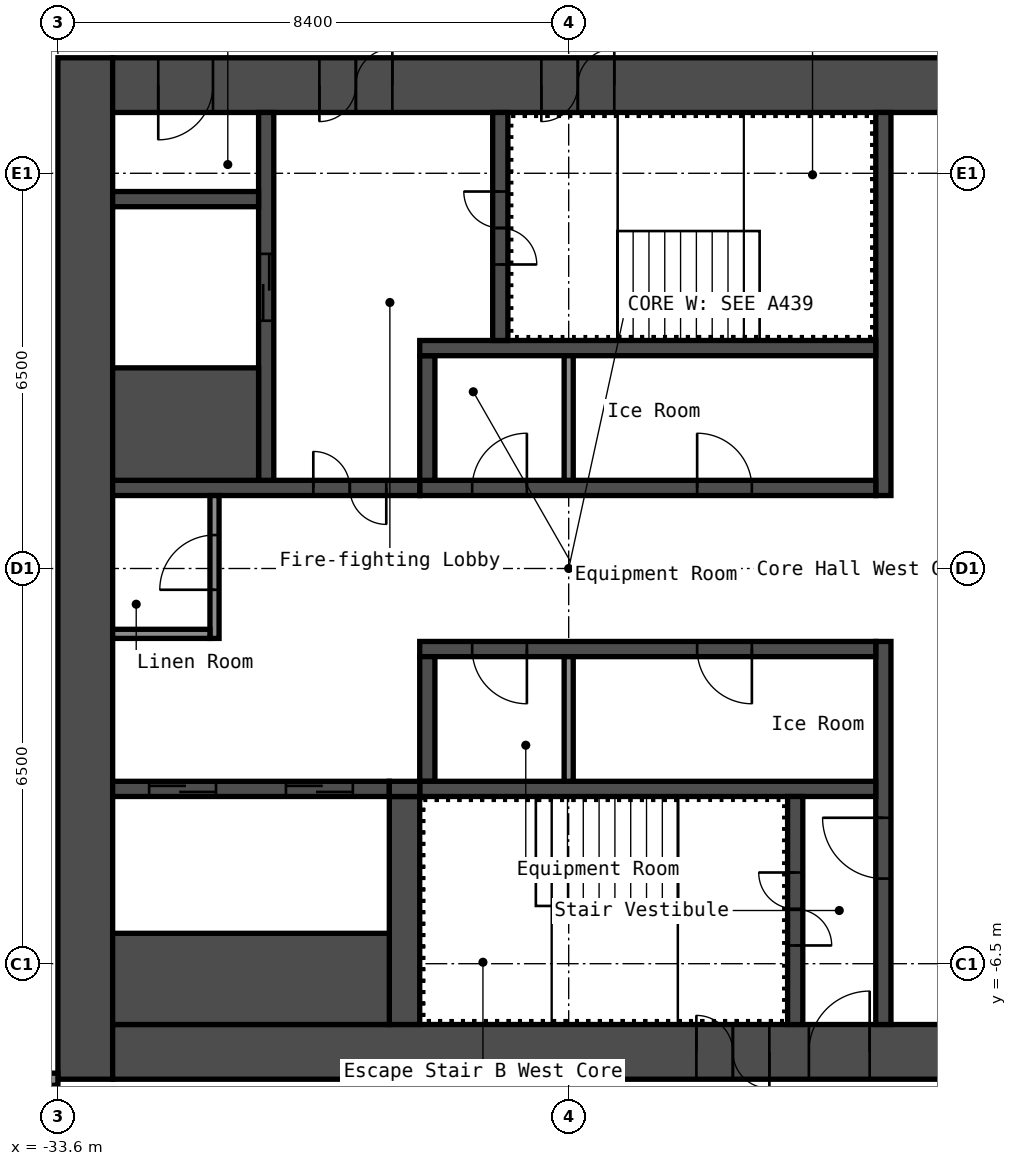
"""IFC4 building model, lengths in metres.
Left out: names, types, materials, properties, quantities, classifications, styles, units other than length and angle.
Written with IfcOpenShell. Run it as: python <this file> out.ifc"""

import sys

from ifc_helpers import new_model, si_unit, direction, frame, frame_2d, origin, place, context, subcontext, project, spatial, rectangle, extrude, element, fill, save


model = new_model("IFC4")
c1 = context("Model", 3, precision=1e-05, world=origin(), true_north=direction((0.0, 1.0)))
c2 = subcontext(c1, "Body", "Model", "MODEL_VIEW")
j1 = project(units=[si_unit("LENGTHUNIT", "METRE"), si_unit("PLANEANGLEUNIT", "RADIAN")], contexts=[c1])
p1 = place(None, origin())
s1 = spatial("IfcSite", under=j1, at=p1, CompositionType="ELEMENT")
p2 = place(p1, origin())
s2 = spatial("IfcBuilding", under=s1, at=p2, CompositionType="ELEMENT")
p3 = place(p2, frame((0.0, 0.0, 270.6)))
s3 = spatial("IfcBuildingStorey", under=s2, at=p3, CompositionType="ELEMENT", Elevation=270.6)
p4 = place(p3, frame((-33.15, -8.4, 0.0), z_axis=(0.0, 0.0, 1.0), x_axis=(0.0, 1.0, 0.0)))
e1 = element("IfcWall", 1, at=p4, inside=s3, PredefinedType="SHEAR", context=c2, shape_type="SweptSolid", body=[
    extrude(rectangle(XDim=16.8, YDim=0.9, at=frame_2d((8.4, 0.0))), origin(), (0.0, 0.0, 1.0), 5.55),
])
p5 = place(p3, frame((-32.7, 7.95, 0.0), z_axis=(0.0, 0.0, 1.0), x_axis=(1.0, 0.0, 0.0)))
e2 = element("IfcWall", 2, at=p5, inside=s3, PredefinedType="SHEAR", context=c2, shape_type="SweptSolid", body=[
    extrude(rectangle(XDim=15.0, YDim=0.9, at=frame_2d((7.5, 0.0))), origin(), (0.0, 0.0, 1.0), 5.55),
])
p6 = place(p5, frame((3.4, 0.0, 0.0)))
e3 = element("IfcOpeningElement", 3, at=p6, cuts=e2, PredefinedType="OPENING", context=c2, shape_type="SweptSolid", body=[
    extrude(rectangle(XDim=1.2, YDim=2.1, at=frame_2d((0.6, 1.05))), frame((0.0, 0.46, 0.0), z_axis=(0.0, -1.0, 0.0), x_axis=(1.0, 0.0, 0.0)), (0.0, 0.0, 1.0), 0.92),
])
p7 = place(p5, frame((0.75, 0.0, 0.0)))
e4 = element("IfcOpeningElement", 4, at=p7, cuts=e2, PredefinedType="OPENING", context=c2, shape_type="SweptSolid", body=[
    extrude(rectangle(XDim=0.9, YDim=2.1, at=frame_2d((0.45, 1.05))), frame((0.0, 0.46, 0.0), z_axis=(0.0, -1.0, 0.0), x_axis=(1.0, 0.0, 0.0)), (0.0, 0.0, 1.0), 0.92),
])
p8 = place(p5, frame((7.05, 0.0, 0.0)))
e5 = element("IfcOpeningElement", 5, at=p8, cuts=e2, PredefinedType="OPENING", context=c2, shape_type="SweptSolid", body=[
    extrude(rectangle(XDim=1.2, YDim=2.1, at=frame_2d((0.6, 1.05))), frame((0.0, 0.46, 0.0), z_axis=(0.0, -1.0, 0.0), x_axis=(1.0, 0.0, 0.0)), (0.0, 0.0, 1.0), 0.92),
])
p9 = place(p3, frame((-32.7, -7.95, 0.0), z_axis=(0.0, 0.0, 1.0), x_axis=(1.0, 0.0, 0.0)))
e6 = element("IfcWall", 6, at=p9, inside=s3, PredefinedType="SHEAR", context=c2, shape_type="SweptSolid", body=[
    extrude(rectangle(XDim=15.0, YDim=0.9, at=frame_2d((7.5, 0.0))), origin(), (0.0, 0.0, 1.0), 5.55),
])
p10 = place(p9, frame((11.45, 0.0, 0.0)))
e7 = element("IfcOpeningElement", 7, at=p10, cuts=e6, PredefinedType="OPENING", context=c2, shape_type="SweptSolid", body=[
    extrude(rectangle(XDim=1.0, YDim=2.1, at=frame_2d((0.5, 1.05))), frame((0.0, 0.46, 0.0), z_axis=(0.0, -1.0, 0.0), x_axis=(1.0, 0.0, 0.0)), (0.0, 0.0, 1.0), 0.92),
])
p11 = place(p9, frame((9.6, 0.0, 0.0)))
e8 = element("IfcOpeningElement", 8, at=p11, cuts=e6, PredefinedType="OPENING", context=c2, shape_type="SweptSolid", body=[
    extrude(rectangle(XDim=1.2, YDim=2.1, at=frame_2d((0.6, 1.05))), frame((0.0, 0.46, 0.0), z_axis=(0.0, -1.0, 0.0), x_axis=(1.0, 0.0, 0.0)), (0.0, 0.0, 1.0), 0.92),
])
p12 = place(p3, frame((-20.025, 1.2, 0.0), z_axis=(0.0, 0.0, 1.0), x_axis=(0.0, 1.0, 0.0)))
e9 = element("IfcWall", 9, at=p12, inside=s3, PredefinedType="SHEAR", context=c2, shape_type="SweptSolid", body=[
    extrude(rectangle(XDim=6.3, YDim=0.25, at=frame_2d((3.15, 0.0))), origin(), (0.0, 0.0, 1.0), 5.55),
])
p13 = place(p3, frame((-20.025, -7.5, 0.0), z_axis=(0.0, 0.0, 1.0), x_axis=(0.0, 1.0, 0.0)))
e10 = element("IfcWall", 10, at=p13, inside=s3, PredefinedType="SHEAR", context=c2, shape_type="SweptSolid", body=[
    extrude(rectangle(XDim=6.3, YDim=0.25, at=frame_2d((3.15, 0.0))), origin(), (0.0, 0.0, 1.0), 5.55),
])
p14 = place(p13, frame((2.4, 0.0, 0.0)))
e11 = element("IfcOpeningElement", 11, at=p14, cuts=e10, PredefinedType="OPENING", context=c2, shape_type="SweptSolid", body=[
    extrude(rectangle(XDim=1.0, YDim=2.1, at=frame_2d((0.5, 1.05))), frame((0.0, 0.135, 0.0), z_axis=(0.0, -1.0, 0.0), x_axis=(1.0, 0.0, 0.0)), (0.0, 0.0, 1.0), 0.27),
])
p15 = place(p3, frame((-27.65, 1.325, 0.0), z_axis=(0.0, 0.0, 1.0), x_axis=(1.0, 0.0, 0.0)))
e12 = element("IfcWall", 12, at=p15, inside=s3, PredefinedType="SHEAR", context=c2, shape_type="SweptSolid", body=[
    extrude(rectangle(XDim=7.5, YDim=0.25, at=frame_2d((3.75, 0.0))), origin(), (0.0, 0.0, 1.0), 5.55),
])
p16 = place(p15, frame((4.562, 0.0, 0.0)))
e13 = element("IfcOpeningElement", 13, at=p16, cuts=e12, PredefinedType="OPENING", context=c2, shape_type="SweptSolid", body=[
    extrude(rectangle(XDim=0.9, YDim=2.1, at=frame_2d((0.45, 1.05))), frame((0.0, 0.135, 0.0), z_axis=(0.0, -1.0, 0.0), x_axis=(1.0, 0.0, 0.0)), (0.0, 0.0, 1.0), 0.27),
])
p17 = place(p15, frame((0.863, 0.0, 0.0)))
e14 = element("IfcOpeningElement", 14, at=p17, cuts=e12, PredefinedType="OPENING", context=c2, shape_type="SweptSolid", body=[
    extrude(rectangle(XDim=0.9, YDim=2.1, at=frame_2d((0.45, 1.05))), frame((0.0, 0.135, 0.0), z_axis=(0.0, -1.0, 0.0), x_axis=(1.0, 0.0, 0.0)), (0.0, 0.0, 1.0), 0.27),
])
p18 = place(p3, frame((-27.525, 1.45, 0.0), z_axis=(0.0, 0.0, 1.0), x_axis=(0.0, 1.0, 0.0)))
e15 = element("IfcWall", 15, at=p18, inside=s3, PredefinedType="SHEAR", context=c2, shape_type="SweptSolid", body=[
    extrude(rectangle(XDim=2.05, YDim=0.25, at=frame_2d((1.025, 0.0))), origin(), (0.0, 0.0, 1.0), 5.55),
])
p19 = place(p3, frame((-27.65, 3.625, 0.0), z_axis=(0.0, 0.0, 1.0), x_axis=(1.0, 0.0, 0.0)))
e16 = element("IfcWall", 16, at=p19, inside=s3, PredefinedType="SHEAR", context=c2, shape_type="SweptSolid", body=[
    extrude(rectangle(XDim=7.5, YDim=0.25, at=frame_2d((3.75, 0.0))), origin(), (0.0, 0.0, 1.0), 5.55),
])
p20 = place(p3, frame((-26.325, 3.75, 0.0), z_axis=(0.0, 0.0, 1.0), x_axis=(0.0, 1.0, 0.0)))
e17 = element("IfcWall", 17, at=p20, inside=s3, PredefinedType="SHEAR", context=c2, shape_type="SweptSolid", body=[
    extrude(rectangle(XDim=3.75, YDim=0.25, at=frame_2d((1.875, 0.0))), origin(), (0.0, 0.0, 1.0), 5.55),
])
p21 = place(p20, frame((1.25, 0.0, 0.0)))
e18 = element("IfcOpeningElement", 18, at=p21, cuts=e17, PredefinedType="OPENING", context=c2, shape_type="SweptSolid", body=[
    extrude(rectangle(XDim=1.2, YDim=2.1, at=frame_2d((0.6, 1.05))), frame((0.0, 0.135, 0.0), z_axis=(0.0, -1.0, 0.0), x_axis=(1.0, 0.0, 0.0)), (0.0, 0.0, 1.0), 0.27),
])
p22 = place(p3, frame((-32.7, 1.325, 0.0), z_axis=(0.0, 0.0, 1.0), x_axis=(1.0, 0.0, 0.0)))
e19 = element("IfcWall", 19, at=p22, inside=s3, PredefinedType="SHEAR", context=c2, shape_type="SweptSolid", body=[
    extrude(rectangle(XDim=5.05, YDim=0.25, at=frame_2d((2.525, 0.0))), origin(), (0.0, 0.0, 1.0), 5.55),
])
p23 = place(p22, frame((3.3, 0.0, 0.0)))
e20 = element("IfcOpeningElement", 20, at=p23, cuts=e19, PredefinedType="OPENING", context=c2, shape_type="SweptSolid", body=[
    extrude(rectangle(XDim=1.2, YDim=2.1, at=frame_2d((0.6, 1.05))), frame((0.0, 0.135, 0.0), z_axis=(0.0, -1.0, 0.0), x_axis=(1.0, 0.0, 0.0)), (0.0, 0.0, 1.0), 0.27),
])
p24 = place(p3, frame((-30.175, 1.45, 0.0), z_axis=(0.0, 0.0, 1.0), x_axis=(0.0, 1.0, 0.0)))
e21 = element("IfcWall", 21, at=p24, inside=s3, PredefinedType="SHEAR", context=c2, shape_type="SweptSolid", body=[
    extrude(rectangle(XDim=6.05, YDim=0.25, at=frame_2d((3.025, 0.0))), origin(), (0.0, 0.0, 1.0), 5.55),
])
p25 = place(p24, frame((2.625, 0.0, 0.0)))
e22 = element("IfcOpeningElement", 22, at=p25, cuts=e21, PredefinedType="OPENING", context=c2, shape_type="SweptSolid", body=[
    extrude(rectangle(XDim=1.1, YDim=2.1, at=frame_2d((0.55, 1.05))), frame((0.0, 0.135, 0.0), z_axis=(0.0, -1.0, 0.0), x_axis=(1.0, 0.0, 0.0)), (0.0, 0.0, 1.0), 0.27),
])
p26 = place(p3, frame((-32.7, 2.375, 0.0), z_axis=(0.0, 0.0, 1.0), x_axis=(1.0, 0.0, 0.0)))
e23 = element("IfcWall", 23, at=p26, inside=s3, PredefinedType="SHEAR", context=c2, shape_type="SweptSolid", body=[
    extrude(rectangle(XDim=2.4, YDim=1.85, at=frame_2d((1.2, 0.0))), origin(), (0.0, 0.0, 1.0), 5.55),
])
p27 = place(p3, frame((-32.7, 6.075, 0.0), z_axis=(0.0, 0.0, 1.0), x_axis=(1.0, 0.0, 0.0)))
e24 = element("IfcWall", 24, at=p27, inside=s3, PredefinedType="SHEAR", context=c2, shape_type="SweptSolid", body=[
    extrude(rectangle(XDim=2.4, YDim=0.25, at=frame_2d((1.2, 0.0))), origin(), (0.0, 0.0, 1.0), 5.55),
])
p28 = place(p3, frame((-27.65, -1.325, 0.0), z_axis=(0.0, 0.0, 1.0), x_axis=(1.0, 0.0, 0.0)))
e25 = element("IfcWall", 25, at=p28, inside=s3, PredefinedType="SHEAR", context=c2, shape_type="SweptSolid", body=[
    extrude(rectangle(XDim=7.5, YDim=0.25, at=frame_2d((3.75, 0.0))), origin(), (0.0, 0.0, 1.0), 5.55),
])
p29 = place(p28, frame((4.562, 0.0, 0.0)))
e26 = element("IfcOpeningElement", 26, at=p29, cuts=e25, PredefinedType="OPENING", context=c2, shape_type="SweptSolid", body=[
    extrude(rectangle(XDim=0.9, YDim=2.1, at=frame_2d((0.45, 1.05))), frame((0.0, 0.135, 0.0), z_axis=(0.0, -1.0, 0.0), x_axis=(1.0, 0.0, 0.0)), (0.0, 0.0, 1.0), 0.27),
])
p30 = place(p28, frame((0.863, 0.0, 0.0)))
e27 = element("IfcOpeningElement", 27, at=p30, cuts=e25, PredefinedType="OPENING", context=c2, shape_type="SweptSolid", body=[
    extrude(rectangle(XDim=0.9, YDim=2.1, at=frame_2d((0.45, 1.05))), frame((0.0, 0.135, 0.0), z_axis=(0.0, -1.0, 0.0), x_axis=(1.0, 0.0, 0.0)), (0.0, 0.0, 1.0), 0.27),
])
p31 = place(p3, frame((-27.525, -3.5, 0.0), z_axis=(0.0, 0.0, 1.0), x_axis=(0.0, 1.0, 0.0)))
e28 = element("IfcWall", 28, at=p31, inside=s3, PredefinedType="SHEAR", context=c2, shape_type="SweptSolid", body=[
    extrude(rectangle(XDim=2.05, YDim=0.25, at=frame_2d((1.025, 0.0))), origin(), (0.0, 0.0, 1.0), 5.55),
])
p32 = place(p3, frame((-27.65, -3.625, 0.0), z_axis=(0.0, 0.0, 1.0), x_axis=(1.0, 0.0, 0.0)))
e29 = element("IfcWall", 29, at=p32, inside=s3, PredefinedType="SHEAR", context=c2, shape_type="SweptSolid", body=[
    extrude(rectangle(XDim=7.5, YDim=0.25, at=frame_2d((3.75, 0.0))), origin(), (0.0, 0.0, 1.0), 5.55),
])
p33 = place(p3, frame((-21.475, -7.5, 0.0), z_axis=(0.0, 0.0, 1.0), x_axis=(0.0, 1.0, 0.0)))
e30 = element("IfcWall", 30, at=p33, inside=s3, PredefinedType="SHEAR", context=c2, shape_type="SweptSolid", body=[
    extrude(rectangle(XDim=3.75, YDim=0.25, at=frame_2d((1.875, 0.0))), origin(), (0.0, 0.0, 1.0), 5.55),
])
p34 = place(p33, frame((1.3, 0.0, 0.0)))
e31 = element("IfcOpeningElement", 31, at=p34, cuts=e30, PredefinedType="OPENING", context=c2, shape_type="SweptSolid", body=[
    extrude(rectangle(XDim=1.2, YDim=2.1, at=frame_2d((0.6, 1.05))), frame((0.0, 0.135, 0.0), z_axis=(0.0, -1.0, 0.0), x_axis=(1.0, 0.0, 0.0)), (0.0, 0.0, 1.0), 0.27),
])
p35 = place(p3, frame((-27.9, -7.5, 0.0), z_axis=(0.0, 0.0, 1.0), x_axis=(0.0, 1.0, 0.0)))
e32 = element("IfcWall", 32, at=p35, inside=s3, PredefinedType="SHEAR", context=c2, shape_type="SweptSolid", body=[
    extrude(rectangle(XDim=3.75, YDim=0.5, at=frame_2d((1.875, 0.0))), origin(), (0.0, 0.0, 1.0), 5.55),
])
p36 = place(p3, frame((-32.7, -3.625, 0.0), z_axis=(0.0, 0.0, 1.0), x_axis=(1.0, 0.0, 0.0)))
e33 = element("IfcWall", 33, at=p36, inside=s3, PredefinedType="SHEAR", context=c2, shape_type="SweptSolid", body=[
    extrude(rectangle(XDim=4.55, YDim=0.25, at=frame_2d((2.275, 0.0))), origin(), (0.0, 0.0, 1.0), 5.55),
])
p37 = place(p36, frame((2.85, 0.0, 0.0)))
e34 = element("IfcOpeningElement", 34, at=p37, cuts=e33, PredefinedType="OPENING", context=c2, shape_type="SweptSolid", body=[
    extrude(rectangle(XDim=1.1, YDim=2.1, at=frame_2d((0.55, 1.05))), frame((0.0, 0.135, 0.0), z_axis=(0.0, -1.0, 0.0), x_axis=(1.0, 0.0, 0.0)), (0.0, 0.0, 1.0), 0.27),
])
p38 = place(p36, frame((0.6, 0.0, 0.0)))
e35 = element("IfcOpeningElement", 35, at=p38, cuts=e33, PredefinedType="OPENING", context=c2, shape_type="SweptSolid", body=[
    extrude(rectangle(XDim=1.1, YDim=2.1, at=frame_2d((0.55, 1.05))), frame((0.0, 0.135, 0.0), z_axis=(0.0, -1.0, 0.0), x_axis=(1.0, 0.0, 0.0)), (0.0, 0.0, 1.0), 0.27),
])
p39 = place(p3, frame((-32.7, -6.75, 0.0), z_axis=(0.0, 0.0, 1.0), x_axis=(1.0, 0.0, 0.0)))
e36 = element("IfcWall", 36, at=p39, inside=s3, PredefinedType="SHEAR", context=c2, shape_type="SweptSolid", body=[
    extrude(rectangle(XDim=4.55, YDim=1.5, at=frame_2d((2.275, 0.0))), origin(), (0.0, 0.0, 1.0), 5.55),
])
p40 = place(p3, frame((-28.15, -3.625, 0.0), z_axis=(0.0, 0.0, 1.0), x_axis=(1.0, 0.0, 0.0)))
e37 = element("IfcWall", 37, at=p40, inside=s3, PredefinedType="SHEAR", context=c2, shape_type="SweptSolid", body=[
    extrude(rectangle(XDim=0.5, YDim=0.25, at=frame_2d((0.25, 0.0))), origin(), (0.0, 0.0, 1.0), 5.55),
])
p41 = place(p3, frame((-31.025, -1.15, 0.0), z_axis=(0.0, 0.0, 1.0), x_axis=(0.0, 1.0, 0.0)))
e38 = element("IfcWall", 38, at=p41, inside=s3, PredefinedType="PARTITIONING", context=c2, shape_type="SweptSolid", body=[
    extrude(rectangle(XDim=2.35, YDim=0.15, at=frame_2d((1.175, 0.0))), origin(), (0.0, 0.0, 1.0), 5.55),
])
p42 = place(p41, frame((0.8, 0.0, 0.0)))
e39 = element("IfcOpeningElement", 39, at=p42, cuts=e38, PredefinedType="OPENING", context=c2, shape_type="SweptSolid", body=[
    extrude(rectangle(XDim=0.9, YDim=2.1, at=frame_2d((0.45, 1.05))), frame((0.0, 0.085, 0.0), z_axis=(0.0, -1.0, 0.0), x_axis=(1.0, 0.0, 0.0)), (0.0, 0.0, 1.0), 0.17),
])
p43 = place(p3, frame((-32.7, -1.075, 0.0), z_axis=(0.0, 0.0, 1.0), x_axis=(1.0, 0.0, 0.0)))
e40 = element("IfcWall", 40, at=p43, inside=s3, PredefinedType="PARTITIONING", context=c2, shape_type="SweptSolid", body=[
    extrude(rectangle(XDim=1.6, YDim=0.15, at=frame_2d((0.8, 0.0))), origin(), (0.0, 0.0, 1.0), 5.55),
])
for number, where, z_axis, x_axis in (
    (41, (-25.2, 1.45, 0.0), (0.0, 0.0, 1.0), (0.0, 1.0, 0.0)),
    (42, (-25.2, -3.5, 0.0), (0.0, 0.0, 1.0), (0.0, 1.0, 0.0)),
):
    element("IfcWall", number, at=place(p3, frame(where, z_axis=z_axis, x_axis=x_axis)), inside=s3, PredefinedType="PARTITIONING", context=c2, shape_type="SweptSolid", body=[
        extrude(rectangle(XDim=2.05, YDim=0.15, at=frame_2d((1.025, 0.0))), origin(), (0.0, 0.0, 1.0), 5.55),
    ])
p44 = place(p3, frame((-37.164, -8.4, 0.0), z_axis=(0.0, 0.0, 1.0), x_axis=(1.0, 0.0, 0.0)))
e43 = element("IfcWall", 43, at=p44, inside=s3, PredefinedType="PARTITIONING", context=c2, shape_type="SweptSolid", body=[
    extrude(rectangle(XDim=3.564, YDim=0.2, at=frame_2d((1.782, 0.0))), origin(), (0.0, 0.0, 1.0), 5.55),
])
p45 = place(p44, frame((0.652, 0.0, 0.0)))
e44 = element("IfcOpeningElement", 44, at=p45, cuts=e43, PredefinedType="OPENING", context=c2, shape_type="SweptSolid", body=[
    extrude(rectangle(XDim=1.6, YDim=2.1, at=frame_2d((0.8, 1.05))), frame((0.0, 0.11, 0.0), z_axis=(0.0, -1.0, 0.0), x_axis=(1.0, 0.0, 0.0)), (0.0, 0.0, 1.0), 0.22),
])
p46 = place(p6, origin())
e45 = element("IfcDoor", 45, at=p46, inside=s3, OperationType="DOUBLE_DOOR_SINGLE_SWING", PredefinedType="DOOR", context=c2, shape_type="SweptSolid", body=[
    extrude(rectangle(XDim=1.2, YDim=2.1, at=frame_2d((0.6, 1.05))), frame((0.0, 0.025, 0.0), z_axis=(0.0, -1.0, 0.0), x_axis=(1.0, 0.0, 0.0)), (0.0, 0.0, 1.0), 0.05),
])
fill(e3, e45)
p47 = place(p7, origin())
e46 = element("IfcDoor", 46, at=p47, inside=s3, OperationType="SINGLE_SWING_LEFT", PredefinedType="DOOR", context=c2, shape_type="SweptSolid", body=[
    extrude(rectangle(XDim=0.9, YDim=2.1, at=frame_2d((0.45, 1.05))), frame((0.0, 0.025, 0.0), z_axis=(0.0, -1.0, 0.0), x_axis=(1.0, 0.0, 0.0)), (0.0, 0.0, 1.0), 0.05),
])
fill(e4, e46)
p48 = place(p10, origin())
e47 = element("IfcDoor", 47, at=p48, inside=s3, OperationType="SINGLE_SWING_LEFT", PredefinedType="DOOR", context=c2, shape_type="SweptSolid", body=[
    extrude(rectangle(XDim=1.0, YDim=2.1, at=frame_2d((0.5, 1.05))), frame((0.0, 0.025, 0.0), z_axis=(0.0, -1.0, 0.0), x_axis=(1.0, 0.0, 0.0)), (0.0, 0.0, 1.0), 0.05),
])
fill(e7, e47)
p49 = place(p8, origin())
e48 = element("IfcDoor", 48, at=p49, inside=s3, OperationType="DOUBLE_DOOR_SINGLE_SWING", PredefinedType="DOOR", context=c2, shape_type="SweptSolid", body=[
    extrude(rectangle(XDim=1.2, YDim=2.1, at=frame_2d((0.6, 1.05))), frame((0.0, 0.025, 0.0), z_axis=(0.0, -1.0, 0.0), x_axis=(1.0, 0.0, 0.0)), (0.0, 0.0, 1.0), 0.05),
])
fill(e5, e48)
p50 = place(p11, origin())
e49 = element("IfcDoor", 49, at=p50, inside=s3, OperationType="DOUBLE_DOOR_SINGLE_SWING", PredefinedType="DOOR", context=c2, shape_type="SweptSolid", body=[
    extrude(rectangle(XDim=1.2, YDim=2.1, at=frame_2d((0.6, 1.05))), frame((0.0, 0.025, 0.0), z_axis=(0.0, -1.0, 0.0), x_axis=(1.0, 0.0, 0.0)), (0.0, 0.0, 1.0), 0.05),
])
fill(e8, e49)
p51 = place(p21, origin())
e50 = element("IfcDoor", 50, at=p51, inside=s3, OperationType="DOUBLE_DOOR_SINGLE_SWING", PredefinedType="DOOR", context=c2, shape_type="SweptSolid", body=[
    extrude(rectangle(XDim=1.2, YDim=2.1, at=frame_2d((0.6, 1.05))), frame((0.0, 0.025, 0.0), z_axis=(0.0, -1.0, 0.0), x_axis=(1.0, 0.0, 0.0)), (0.0, 0.0, 1.0), 0.05),
])
fill(e18, e50)
p52 = place(p34, origin())
e51 = element("IfcDoor", 51, at=p52, inside=s3, OperationType="DOUBLE_DOOR_SINGLE_SWING", PredefinedType="DOOR", context=c2, shape_type="SweptSolid", body=[
    extrude(rectangle(XDim=1.2, YDim=2.1, at=frame_2d((0.6, 1.05))), frame((0.0, 0.025, 0.0), z_axis=(0.0, -1.0, 0.0), x_axis=(1.0, 0.0, 0.0)), (0.0, 0.0, 1.0), 0.05),
])
fill(e31, e51)
p53 = place(p14, origin())
e52 = element("IfcDoor", 52, at=p53, inside=s3, OperationType="SINGLE_SWING_LEFT", PredefinedType="DOOR", context=c2, shape_type="SweptSolid", body=[
    extrude(rectangle(XDim=1.0, YDim=2.1, at=frame_2d((0.5, 1.05))), frame((0.0, 0.025, 0.0), z_axis=(0.0, -1.0, 0.0), x_axis=(1.0, 0.0, 0.0)), (0.0, 0.0, 1.0), 0.05),
])
fill(e11, e52)
p54 = place(p23, origin())
e53 = element("IfcDoor", 53, at=p54, inside=s3, OperationType="DOUBLE_DOOR_SINGLE_SWING", PredefinedType="DOOR", context=c2, shape_type="SweptSolid", body=[
    extrude(rectangle(XDim=1.2, YDim=2.1, at=frame_2d((0.6, 1.05))), frame((0.0, 0.025, 0.0), z_axis=(0.0, -1.0, 0.0), x_axis=(1.0, 0.0, 0.0)), (0.0, 0.0, 1.0), 0.05),
])
fill(e20, e53)
p55 = place(p42, origin())
e54 = element("IfcDoor", 54, at=p55, inside=s3, OperationType="SINGLE_SWING_RIGHT", PredefinedType="DOOR", context=c2, shape_type="SweptSolid", body=[
    extrude(rectangle(XDim=0.9, YDim=2.1, at=frame_2d((0.45, 1.05))), frame((0.0, 0.025, 0.0), z_axis=(0.0, -1.0, 0.0), x_axis=(1.0, 0.0, 0.0)), (0.0, 0.0, 1.0), 0.05),
])
fill(e39, e54)
p56 = place(p16, origin())
e55 = element("IfcDoor", 55, at=p56, inside=s3, OperationType="SINGLE_SWING_RIGHT", PredefinedType="DOOR", context=c2, shape_type="SweptSolid", body=[
    extrude(rectangle(XDim=0.9, YDim=2.1, at=frame_2d((0.45, 1.05))), frame((0.0, 0.025, 0.0), z_axis=(0.0, -1.0, 0.0), x_axis=(1.0, 0.0, 0.0)), (0.0, 0.0, 1.0), 0.05),
])
fill(e13, e55)
p57 = place(p17, origin())
e56 = element("IfcDoor", 56, at=p57, inside=s3, OperationType="SINGLE_SWING_LEFT", PredefinedType="DOOR", context=c2, shape_type="SweptSolid", body=[
    extrude(rectangle(XDim=0.9, YDim=2.1, at=frame_2d((0.45, 1.05))), frame((0.0, 0.025, 0.0), z_axis=(0.0, -1.0, 0.0), x_axis=(1.0, 0.0, 0.0)), (0.0, 0.0, 1.0), 0.05),
])
fill(e14, e56)
p58 = place(p29, origin())
e57 = element("IfcDoor", 57, at=p58, inside=s3, OperationType="SINGLE_SWING_RIGHT", PredefinedType="DOOR", context=c2, shape_type="SweptSolid", body=[
    extrude(rectangle(XDim=0.9, YDim=2.1, at=frame_2d((0.45, 1.05))), frame((0.0, 0.025, 0.0), z_axis=(0.0, -1.0, 0.0), x_axis=(1.0, 0.0, 0.0)), (0.0, 0.0, 1.0), 0.05),
])
fill(e26, e57)
p59 = place(p30, origin())
e58 = element("IfcDoor", 58, at=p59, inside=s3, OperationType="SINGLE_SWING_RIGHT", PredefinedType="DOOR", context=c2, shape_type="SweptSolid", body=[
    extrude(rectangle(XDim=0.9, YDim=2.1, at=frame_2d((0.45, 1.05))), frame((0.0, 0.025, 0.0), z_axis=(0.0, -1.0, 0.0), x_axis=(1.0, 0.0, 0.0)), (0.0, 0.0, 1.0), 0.05),
])
fill(e27, e58)
p60 = place(p25, origin())
e59 = element("IfcDoor", 59, at=p60, inside=s3, OperationType="DOUBLE_DOOR_SLIDING", PredefinedType="DOOR", context=c2, shape_type="SweptSolid", body=[
    extrude(rectangle(XDim=1.1, YDim=2.1, at=frame_2d((0.55, 1.05))), frame((0.0, 0.025, 0.0), z_axis=(0.0, -1.0, 0.0), x_axis=(1.0, 0.0, 0.0)), (0.0, 0.0, 1.0), 0.05),
])
fill(e22, e59)
p61 = place(p37, origin())
e60 = element("IfcDoor", 60, at=p61, inside=s3, OperationType="DOUBLE_DOOR_SLIDING", PredefinedType="DOOR", context=c2, shape_type="SweptSolid", body=[
    extrude(rectangle(XDim=1.1, YDim=2.1, at=frame_2d((0.55, 1.05))), frame((0.0, 0.025, 0.0), z_axis=(0.0, -1.0, 0.0), x_axis=(1.0, 0.0, 0.0)), (0.0, 0.0, 1.0), 0.05),
])
fill(e34, e60)
p62 = place(p38, origin())
e61 = element("IfcDoor", 61, at=p62, inside=s3, OperationType="DOUBLE_DOOR_SLIDING", PredefinedType="DOOR", context=c2, shape_type="SweptSolid", body=[
    extrude(rectangle(XDim=1.1, YDim=2.1, at=frame_2d((0.55, 1.05))), frame((0.0, 0.025, 0.0), z_axis=(0.0, -1.0, 0.0), x_axis=(1.0, 0.0, 0.0)), (0.0, 0.0, 1.0), 0.05),
])
fill(e35, e61)
save(model, sys.argv[1])
